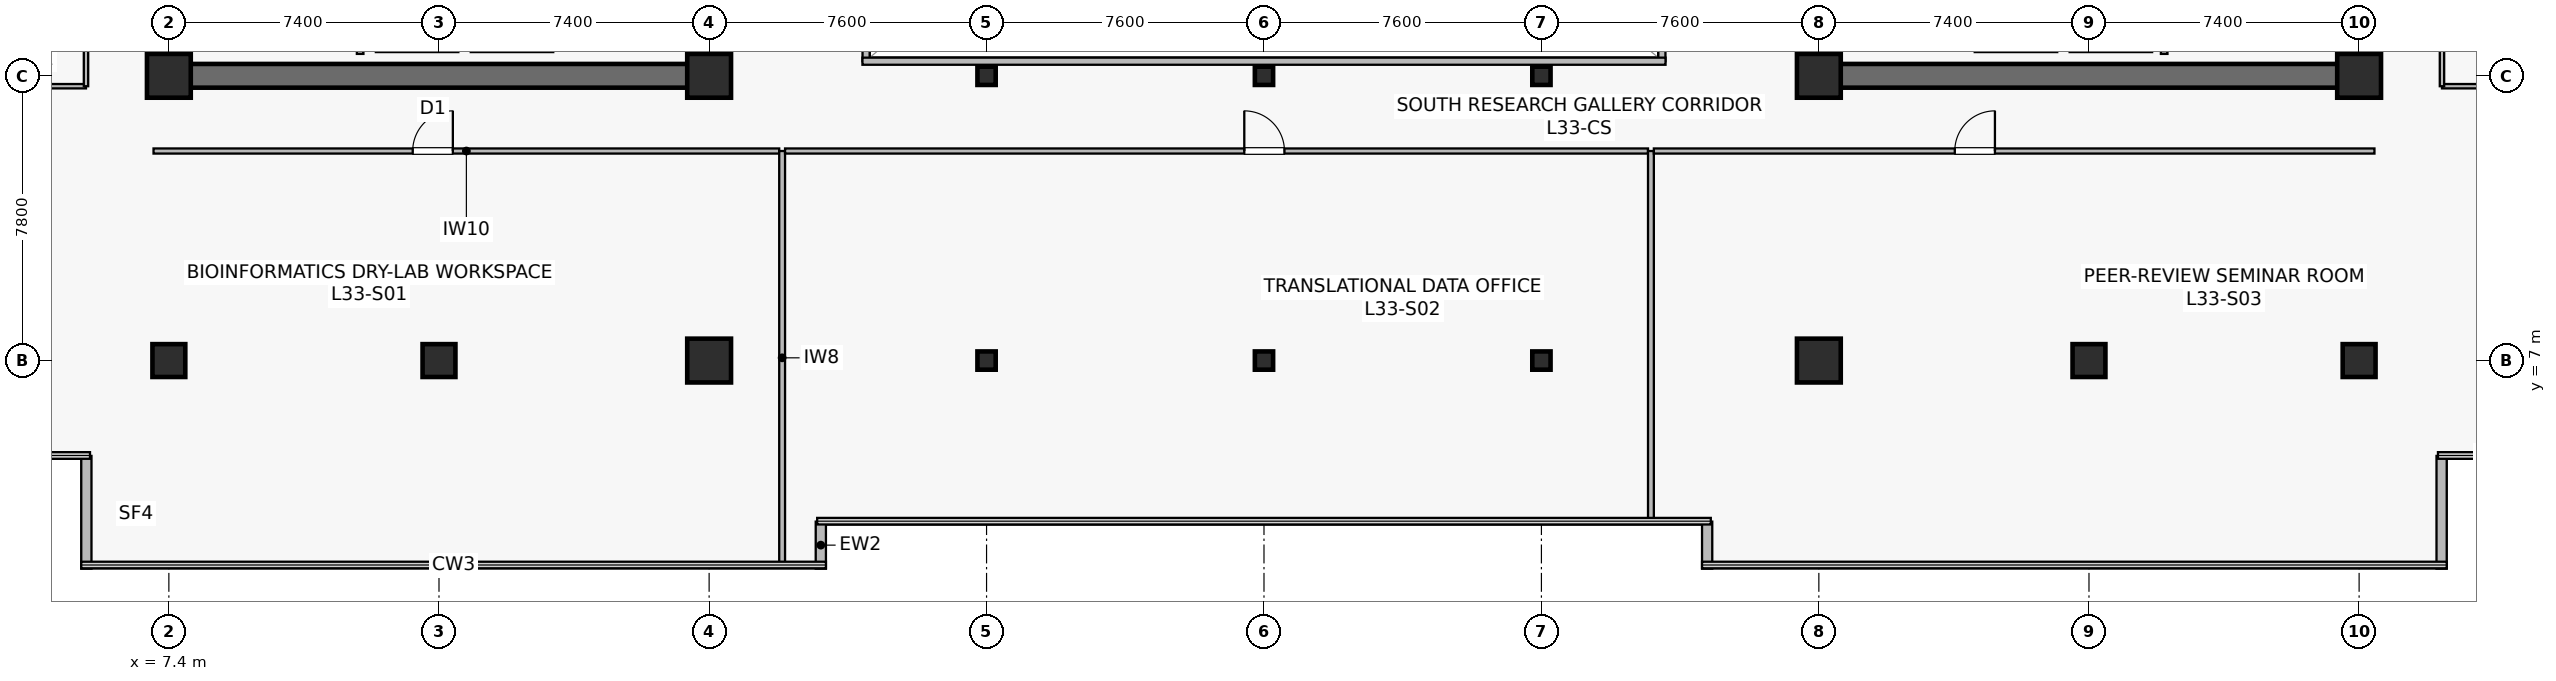
"""IFC4 building model, lengths in metres.
Left out: names, types, materials, properties, quantities, classifications, styles, units other than length and angle.
Written with IfcOpenShell. Run it as: python <this file> out.ifc"""

import sys

from ifc_helpers import new_model, si_unit, direction, frame, frame_2d, origin, origin_2d, place, context, subcontext, project, spatial, rectangle, hollow_rectangle, extrude, source, transform, mapped, element, fill, save


model = new_model("IFC4")
c1 = context("Model", 3, precision=1e-05, world=origin(), true_north=direction((0.0, 1.0)))
c2 = subcontext(c1, "Body", "Model", "MODEL_VIEW")
j1 = project(units=[si_unit("LENGTHUNIT", "METRE"), si_unit("PLANEANGLEUNIT", "RADIAN")], contexts=[c1])
p1 = place(None, origin())
s1 = spatial("IfcSite", under=j1, at=p1, CompositionType="ELEMENT")
p2 = place(p1, origin())
s2 = spatial("IfcBuilding", under=s1, at=p2, CompositionType="ELEMENT")
p3 = place(p2, frame((0.0, 0.0, 137.9)))
s3 = spatial("IfcBuildingStorey", under=s2, at=p3, CompositionType="ELEMENT", Elevation=137.9)
p4 = place(p3, frame((7.075, 14.8, 0.0), z_axis=(0.0, 0.0, 1.0), x_axis=(1.0, 0.0, 0.0)))
e1 = element("IfcWall", 1, at=p4, inside=s3, PredefinedType="SHEAR", context=c2, shape_type="SweptSolid", body=[
    extrude(rectangle(XDim=15.45, YDim=0.65, at=frame_2d((7.725, 0.0))), origin(), (0.0, 0.0, 1.0), 3.79),
])
p5 = place(p3, frame((7.4, 15.125, 0.0), z_axis=(0.0, 0.0, 1.0), x_axis=(0.0, 1.0, 0.0)))
e2 = element("IfcWall", 2, at=p5, inside=s3, PredefinedType="SHEAR", context=c2, shape_type="SweptSolid", body=[
    extrude(rectangle(XDim=18.35, YDim=0.65, at=frame_2d((9.175, 0.0))), origin(), (0.0, 0.0, 1.0), 3.79),
])
p6 = place(p3, frame((22.2, 15.125, 0.0), z_axis=(0.0, 0.0, 1.0), x_axis=(0.0, 1.0, 0.0)))
e3 = element("IfcWall", 3, at=p6, inside=s3, PredefinedType="SHEAR", context=c2, shape_type="SweptSolid", body=[
    extrude(rectangle(XDim=18.35, YDim=0.65, at=frame_2d((9.175, 0.0))), origin(), (0.0, 0.0, 1.0), 3.79),
])
p7 = place(p6, frame((3.425, 0.0, 0.0)))
e4 = element("IfcOpeningElement", 4, at=p7, cuts=e3, PredefinedType="OPENING", context=c2, shape_type="SweptSolid", body=[
    extrude(rectangle(XDim=1.42, YDim=2.2, at=frame_2d((0.71, 1.1))), frame((0.0, 0.335, 0.0), z_axis=(0.0, -1.0, 0.0), x_axis=(1.0, 0.0, 0.0)), (0.0, 0.0, 1.0), 0.67),
])
p8 = place(p3, frame((52.275, 14.8, 0.0), z_axis=(0.0, 0.0, 1.0), x_axis=(1.0, 0.0, 0.0)))
e5 = element("IfcWall", 5, at=p8, inside=s3, PredefinedType="SHEAR", context=c2, shape_type="SweptSolid", body=[
    extrude(rectangle(XDim=15.45, YDim=0.65, at=frame_2d((7.725, 0.0))), origin(), (0.0, 0.0, 1.0), 3.79),
])
p9 = place(p3, frame((52.6, 15.125, 0.0), z_axis=(0.0, 0.0, 1.0), x_axis=(0.0, 1.0, 0.0)))
e6 = element("IfcWall", 6, at=p9, inside=s3, PredefinedType="SHEAR", context=c2, shape_type="SweptSolid", body=[
    extrude(rectangle(XDim=18.35, YDim=0.65, at=frame_2d((9.175, 0.0))), origin(), (0.0, 0.0, 1.0), 3.79),
])
p10 = place(p9, frame((3.425, 0.0, 0.0)))
e7 = element("IfcOpeningElement", 7, at=p10, cuts=e6, PredefinedType="OPENING", context=c2, shape_type="SweptSolid", body=[
    extrude(rectangle(XDim=1.42, YDim=2.2, at=frame_2d((0.71, 1.1))), frame((0.0, 0.335, 0.0), z_axis=(0.0, -1.0, 0.0), x_axis=(1.0, 0.0, 0.0)), (0.0, 0.0, 1.0), 0.67),
])
p11 = place(p3, frame((67.4, 15.125, 0.0), z_axis=(0.0, 0.0, 1.0), x_axis=(0.0, 1.0, 0.0)))
e8 = element("IfcWall", 8, at=p11, inside=s3, PredefinedType="SHEAR", context=c2, shape_type="SweptSolid", body=[
    extrude(rectangle(XDim=18.35, YDim=0.65, at=frame_2d((9.175, 0.0))), origin(), (0.0, 0.0, 1.0), 3.79),
])
m1 = source(origin(), c2, "Body", "SweptSolid", [
    extrude(rectangle(XDim=0.9, YDim=0.9, at=origin_2d()), origin(), (0.0, 0.0, 1.0), 4.1),
])
p12 = place(p3, frame((14.8, 7.0, 0.0), z_axis=(0.0, 0.0, 1.0), x_axis=(1.0, 0.0, 0.0)))
e9 = element("IfcColumn", 9, at=p12, inside=s3, PredefinedType="COLUMN", context=c2, shape_type="MappedRepresentation", body=[
    mapped(m1, transform((0.0, 0.0, 0.0), scale=1.0)),
])
m2 = source(origin(), c2, "Body", "SweptSolid", [
    extrude(rectangle(XDim=1.2, YDim=1.2, at=origin_2d()), origin(), (0.0, 0.0, 1.0), 4.1),
])
for number, where, z_axis, x_axis in (
    (10, (22.2, 7.0, 0.0), (0.0, 0.0, 1.0), (1.0, 0.0, 0.0)),
    (11, (7.4, 14.8, 0.0), (0.0, 0.0, 1.0), (1.0, 0.0, 0.0)),
    (12, (22.2, 14.8, 0.0), (0.0, 0.0, 1.0), (1.0, 0.0, 0.0)),
    (13, (52.6, 7.0, 0.0), (0.0, 0.0, 1.0), (1.0, 0.0, 0.0)),
):
    element("IfcColumn", number, at=place(p3, frame(where, z_axis=z_axis, x_axis=x_axis)), inside=s3, PredefinedType="COLUMN", context=c2, shape_type="MappedRepresentation", body=[
        mapped(m2, transform((0.0, 0.0, 0.0), scale=1.0)),
    ])
p13 = place(p3, frame((60.0, 7.0, 0.0), z_axis=(0.0, 0.0, 1.0), x_axis=(1.0, 0.0, 0.0)))
e14 = element("IfcColumn", 14, at=p13, inside=s3, PredefinedType="COLUMN", context=c2, shape_type="MappedRepresentation", body=[
    mapped(m1, transform((0.0, 0.0, 0.0), scale=1.0)),
])
for number, where, z_axis, x_axis in (
    (15, (52.6, 14.8, 0.0), (0.0, 0.0, 1.0), (1.0, 0.0, 0.0)),
    (16, (67.4, 14.8, 0.0), (0.0, 0.0, 1.0), (1.0, 0.0, 0.0)),
):
    element("IfcColumn", number, at=place(p3, frame(where, z_axis=z_axis, x_axis=x_axis)), inside=s3, PredefinedType="COLUMN", context=c2, shape_type="MappedRepresentation", body=[
        mapped(m2, transform((0.0, 0.0, 0.0), scale=1.0)),
    ])
for number, where, z_axis, x_axis in (
    (17, (7.4, 7.0, 0.0), (0.0, 0.0, 1.0), (1.0, 0.0, 0.0)),
    (18, (67.4, 7.0, 0.0), (0.0, 0.0, 1.0), (1.0, 0.0, 0.0)),
):
    element("IfcColumn", number, at=place(p3, frame(where, z_axis=z_axis, x_axis=x_axis)), inside=s3, PredefinedType="COLUMN", context=c2, shape_type="MappedRepresentation", body=[
        mapped(m1, transform((0.0, 0.0, 0.0), scale=1.0)),
    ])
m3 = source(origin(), c2, "Body", "SweptSolid", [
    extrude(hollow_rectangle(XDim=0.5, YDim=0.5, WallThickness=0.022, at=origin_2d()), origin(), (0.0, 0.0, 1.0), 4.1),
])
for number, where, z_axis, x_axis in (
    (19, (29.8, 7.0, 0.0), (0.0, 0.0, 1.0), (1.0, 0.0, 0.0)),
    (20, (29.8, 14.8, 0.0), (0.0, 0.0, 1.0), (1.0, 0.0, 0.0)),
    (21, (37.4, 7.0, 0.0), (0.0, 0.0, 1.0), (1.0, 0.0, 0.0)),
    (22, (37.4, 14.8, 0.0), (0.0, 0.0, 1.0), (1.0, 0.0, 0.0)),
    (23, (45.0, 7.0, 0.0), (0.0, 0.0, 1.0), (1.0, 0.0, 0.0)),
    (24, (45.0, 14.8, 0.0), (0.0, 0.0, 1.0), (1.0, 0.0, 0.0)),
):
    element("IfcColumn", number, at=place(p3, frame(where, z_axis=z_axis, x_axis=x_axis)), inside=s3, PredefinedType="COLUMN", context=c2, shape_type="MappedRepresentation", body=[
        mapped(m3, transform((0.0, 0.0, 0.0), scale=1.0)),
    ])
for number, where, z_axis, x_axis in (
    (25, (25.26, 1.3, 0.0), (0.0, 0.0, 1.0), (0.0, 1.0, 0.0)),
    (26, (49.54, 2.588, 0.0), (0.0, 0.0, 1.0), (0.0, -1.0, 0.0)),
):
    element("IfcWall", number, at=place(p3, frame(where, z_axis=z_axis, x_axis=x_axis)), inside=s3, PredefinedType="STANDARD", context=c2, shape_type="SweptSolid", body=[
        extrude(rectangle(XDim=1.288, YDim=0.28, at=frame_2d((0.644, 0.0))), origin(), (0.0, 0.0, 1.0), 3.79),
    ])
for number, where, z_axis, x_axis in (
    (27, (69.66, 1.3, 0.0), (0.0, 0.0, 1.0), (0.0, 1.0, 0.0)),
    (28, (5.14, 4.388, 0.0), (0.0, 0.0, 1.0), (0.0, -1.0, 0.0)),
):
    element("IfcWall", number, at=place(p3, frame(where, z_axis=z_axis, x_axis=x_axis)), inside=s3, PredefinedType="STANDARD", context=c2, shape_type="SweptSolid", body=[
        extrude(rectangle(XDim=3.088, YDim=0.28, at=frame_2d((1.544, 0.0))), origin(), (0.0, 0.0, 1.0), 3.79),
    ])
p14 = place(p3, frame((13.07, 15.55, 0.0), z_axis=(0.0, 0.0, 1.0), x_axis=(1.0, 0.0, 0.0)))
e29 = element("IfcWall", 29, at=p14, inside=s3, PredefinedType="SOLIDWALL", context=c2, shape_type="SweptSolid", body=[
    extrude(rectangle(XDim=2.26, YDim=0.2, at=frame_2d((1.13, 0.0))), origin(), (0.0, 0.0, 1.0), 3.125),
])
p15 = place(p3, frame((15.67, 15.55, 0.0), z_axis=(0.0, 0.0, 1.0), x_axis=(1.0, 0.0, 0.0)))
e30 = element("IfcWall", 30, at=p15, inside=s3, PredefinedType="SOLIDWALL", context=c2, shape_type="SweptSolid", body=[
    extrude(rectangle(XDim=2.26, YDim=0.2, at=frame_2d((1.13, 0.0))), origin(), (0.0, 0.0, 1.0), 3.79),
])
p16 = place(p3, frame((12.64, 15.4, 0.0), z_axis=(0.0, 0.0, 1.0), x_axis=(0.0, 1.0, 0.0)))
e31 = element("IfcWall", 31, at=p16, inside=s3, PredefinedType="SOLIDWALL", context=c2, shape_type="SweptSolid", body=[
    extrude(rectangle(XDim=2.4, YDim=0.18, at=frame_2d((1.2, 0.0))), origin(), (0.0, 0.0, 1.0), 3.79),
])
p17 = place(p3, frame((59.47, 15.55, 0.0), z_axis=(0.0, 0.0, 1.0), x_axis=(1.0, 0.0, 0.0)))
e32 = element("IfcWall", 32, at=p17, inside=s3, PredefinedType="SOLIDWALL", context=c2, shape_type="SweptSolid", body=[
    extrude(rectangle(XDim=2.26, YDim=0.2, at=frame_2d((1.13, 0.0))), origin(), (0.0, 0.0, 1.0), 3.125),
])
p18 = place(p3, frame((56.87, 15.55, 0.0), z_axis=(0.0, 0.0, 1.0), x_axis=(1.0, 0.0, 0.0)))
e33 = element("IfcWall", 33, at=p18, inside=s3, PredefinedType="SOLIDWALL", context=c2, shape_type="SweptSolid", body=[
    extrude(rectangle(XDim=2.26, YDim=0.2, at=frame_2d((1.13, 0.0))), origin(), (0.0, 0.0, 1.0), 3.79),
])
p19 = place(p3, frame((62.06, 15.4, 0.0), z_axis=(0.0, 0.0, 1.0), x_axis=(0.0, 1.0, 0.0)))
e34 = element("IfcWall", 34, at=p19, inside=s3, PredefinedType="SOLIDWALL", context=c2, shape_type="SweptSolid", body=[
    extrude(rectangle(XDim=2.4, YDim=0.18, at=frame_2d((1.2, 0.0))), origin(), (0.0, 0.0, 1.0), 3.79),
])
p20 = place(p3, frame((26.5, 15.2, 0.0), z_axis=(0.0, 0.0, 1.0), x_axis=(0.0, 1.0, 0.0)))
e35 = element("IfcWall", 35, at=p20, inside=s3, PredefinedType="SOLIDWALL", context=c2, shape_type="SweptSolid", body=[
    extrude(rectangle(XDim=18.2, YDim=0.195, at=frame_2d((9.1, 0.0))), origin(), (0.0, 0.0, 1.0), 3.79),
])
p21 = place(p20, frame((1.8, 0.0, 0.9)))
e36 = element("IfcOpeningElement", 36, at=p21, cuts=e35, PredefinedType="OPENING", context=c2, shape_type="SweptSolid", body=[
    extrude(rectangle(XDim=1.2, YDim=1.35, at=frame_2d((0.6, 0.675))), frame((0.0, 0.107, 0.0), z_axis=(0.0, -1.0, 0.0), x_axis=(1.0, 0.0, 0.0)), (0.0, 0.0, 1.0), 0.215),
])
p22 = place(p20, frame((13.2, 0.0, 0.9)))
e37 = element("IfcOpeningElement", 37, at=p22, cuts=e35, PredefinedType="OPENING", context=c2, shape_type="SweptSolid", body=[
    extrude(rectangle(XDim=1.2, YDim=1.35, at=frame_2d((0.6, 0.675))), frame((0.0, 0.107, 0.0), z_axis=(0.0, -1.0, 0.0), x_axis=(1.0, 0.0, 0.0)), (0.0, 0.0, 1.0), 0.215),
])
p23 = place(p3, frame((48.3, 15.2, 0.0), z_axis=(0.0, 0.0, 1.0), x_axis=(0.0, 1.0, 0.0)))
e38 = element("IfcWall", 38, at=p23, inside=s3, PredefinedType="SOLIDWALL", context=c2, shape_type="SweptSolid", body=[
    extrude(rectangle(XDim=18.2, YDim=0.195, at=frame_2d((9.1, 0.0))), origin(), (0.0, 0.0, 1.0), 3.79),
])
p24 = place(p23, frame((1.8, 0.0, 0.9)))
e39 = element("IfcOpeningElement", 39, at=p24, cuts=e38, PredefinedType="OPENING", context=c2, shape_type="SweptSolid", body=[
    extrude(rectangle(XDim=1.2, YDim=1.35, at=frame_2d((0.6, 0.675))), frame((0.0, 0.107, 0.0), z_axis=(0.0, -1.0, 0.0), x_axis=(1.0, 0.0, 0.0)), (0.0, 0.0, 1.0), 0.215),
])
p25 = place(p23, frame((13.2, 0.0, 0.9)))
e40 = element("IfcOpeningElement", 40, at=p25, cuts=e38, PredefinedType="OPENING", context=c2, shape_type="SweptSolid", body=[
    extrude(rectangle(XDim=1.2, YDim=1.35, at=frame_2d((0.6, 0.675))), frame((0.0, 0.107, 0.0), z_axis=(0.0, -1.0, 0.0), x_axis=(1.0, 0.0, 0.0)), (0.0, 0.0, 1.0), 0.215),
])
p26 = place(p3, frame((26.4, 15.2, 0.0), z_axis=(0.0, 0.0, 1.0), x_axis=(1.0, 0.0, 0.0)))
e41 = element("IfcWall", 41, at=p26, inside=s3, PredefinedType="SOLIDWALL", context=c2, shape_type="SweptSolid", body=[
    extrude(rectangle(XDim=22.0, YDim=0.195, at=frame_2d((11.0, 0.0))), origin(), (0.0, 0.0, 1.0), 3.79),
])
p27 = place(p3, frame((6.98, 12.74, 0.0), z_axis=(0.0, 0.0, 1.0), x_axis=(1.0, 0.0, 0.0)))
e42 = element("IfcWall", 42, at=p27, inside=s3, PredefinedType="PARTITIONING", context=c2, shape_type="SweptSolid", body=[
    extrude(rectangle(XDim=17.14, YDim=0.14, at=frame_2d((8.57, 0.0))), origin(), (0.0, 0.0, 1.0), 3.125),
])
p28 = place(p27, frame((7.1, 0.0, 0.0)))
e43 = element("IfcOpeningElement", 43, at=p28, cuts=e42, PredefinedType="OPENING", context=c2, shape_type="SweptSolid", body=[
    extrude(rectangle(XDim=1.1, YDim=2.18, at=frame_2d((0.55, 1.09))), frame((0.0, 0.08, 0.0), z_axis=(0.0, -1.0, 0.0), x_axis=(1.0, 0.0, 0.0)), (0.0, 0.0, 1.0), 0.16),
])
p29 = place(p3, frame((24.2, 1.41, 0.0), z_axis=(0.0, 0.0, 1.0), x_axis=(0.0, 1.0, 0.0)))
e44 = element("IfcWall", 44, at=p29, inside=s3, PredefinedType="PARTITIONING", context=c2, shape_type="SweptSolid", body=[
    extrude(rectangle(XDim=11.33, YDim=0.16, at=frame_2d((5.665, 0.0))), origin(), (0.0, 0.0, 1.0), 3.075),
])
p30 = place(p3, frame((24.28, 12.74, 0.0), z_axis=(0.0, 0.0, 1.0), x_axis=(1.0, 0.0, 0.0)))
e45 = element("IfcWall", 45, at=p30, inside=s3, PredefinedType="PARTITIONING", context=c2, shape_type="SweptSolid", body=[
    extrude(rectangle(XDim=23.64, YDim=0.14, at=frame_2d((11.82, 0.0))), origin(), (0.0, 0.0, 1.0), 3.125),
])
p31 = place(p30, frame((12.58, 0.0, 0.0)))
e46 = element("IfcOpeningElement", 46, at=p31, cuts=e45, PredefinedType="OPENING", context=c2, shape_type="SweptSolid", body=[
    extrude(rectangle(XDim=1.1, YDim=2.18, at=frame_2d((0.55, 1.09))), frame((0.0, 0.08, 0.0), z_axis=(0.0, -1.0, 0.0), x_axis=(1.0, 0.0, 0.0)), (0.0, 0.0, 1.0), 0.16),
])
p32 = place(p3, frame((48.0, 2.61, 0.0), z_axis=(0.0, 0.0, 1.0), x_axis=(0.0, 1.0, 0.0)))
e47 = element("IfcWall", 47, at=p32, inside=s3, PredefinedType="PARTITIONING", context=c2, shape_type="SweptSolid", body=[
    extrude(rectangle(XDim=10.13, YDim=0.16, at=frame_2d((5.065, 0.0))), origin(), (0.0, 0.0, 1.0), 3.075),
])
p33 = place(p3, frame((48.08, 12.74, 0.0), z_axis=(0.0, 0.0, 1.0), x_axis=(1.0, 0.0, 0.0)))
e48 = element("IfcWall", 48, at=p33, inside=s3, PredefinedType="PARTITIONING", context=c2, shape_type="SweptSolid", body=[
    extrude(rectangle(XDim=19.74, YDim=0.14, at=frame_2d((9.87, 0.0))), origin(), (0.0, 0.0, 1.0), 3.125),
])
p34 = place(p33, frame((8.244, 0.0, 0.0)))
e49 = element("IfcOpeningElement", 49, at=p34, cuts=e48, PredefinedType="OPENING", context=c2, shape_type="SweptSolid", body=[
    extrude(rectangle(XDim=1.1, YDim=2.18, at=frame_2d((0.55, 1.09))), frame((0.0, 0.08, 0.0), z_axis=(0.0, -1.0, 0.0), x_axis=(1.0, 0.0, 0.0)), (0.0, 0.0, 1.0), 0.16),
])
p35 = place(p3, frame((2.11, 14.515, 0.0), z_axis=(0.0, 0.0, 1.0), x_axis=(1.0, 0.0, 0.0)))
e50 = element("IfcWall", 50, at=p35, inside=s3, PredefinedType="PARTITIONING", context=c2, shape_type="SweptSolid", body=[
    extrude(rectangle(XDim=3.02, YDim=0.12, at=frame_2d((1.51, 0.0))), origin(), (0.0, 0.0, 1.0), 3.79),
])
p36 = place(p3, frame((5.13, 14.515, 0.0), z_axis=(0.0, 0.0, 1.0), x_axis=(0.0, 1.0, 0.0)))
e51 = element("IfcWall", 51, at=p36, inside=s3, PredefinedType="PARTITIONING", context=c2, shape_type="SweptSolid", body=[
    extrude(rectangle(XDim=5.025, YDim=0.12, at=frame_2d((2.513, 0.0))), origin(), (0.0, 0.0, 1.0), 3.79),
])
p37 = place(p36, frame((2.062, 0.0, 0.0)))
e52 = element("IfcOpeningElement", 52, at=p37, cuts=e51, PredefinedType="OPENING", context=c2, shape_type="SweptSolid", body=[
    extrude(rectangle(XDim=0.9, YDim=2.1, at=frame_2d((0.45, 1.05))), frame((0.0, 0.07, 0.0), z_axis=(0.0, -1.0, 0.0), x_axis=(1.0, 0.0, 0.0)), (0.0, 0.0, 1.0), 0.14),
])
p38 = place(p3, frame((69.67, 14.515, 0.0), z_axis=(0.0, 0.0, 1.0), x_axis=(1.0, 0.0, 0.0)))
e53 = element("IfcWall", 53, at=p38, inside=s3, PredefinedType="PARTITIONING", context=c2, shape_type="SweptSolid", body=[
    extrude(rectangle(XDim=3.02, YDim=0.12, at=frame_2d((1.51, 0.0))), origin(), (0.0, 0.0, 1.0), 3.79),
])
p39 = place(p3, frame((69.67, 14.515, 0.0), z_axis=(0.0, 0.0, 1.0), x_axis=(0.0, 1.0, 0.0)))
e54 = element("IfcWall", 54, at=p39, inside=s3, PredefinedType="PARTITIONING", context=c2, shape_type="SweptSolid", body=[
    extrude(rectangle(XDim=9.225, YDim=0.12, at=frame_2d((4.613, 0.0))), origin(), (0.0, 0.0, 1.0), 3.79),
])
p40 = place(p39, frame((4.163, 0.0, 0.0)))
e55 = element("IfcOpeningElement", 55, at=p40, cuts=e54, PredefinedType="OPENING", context=c2, shape_type="SweptSolid", body=[
    extrude(rectangle(XDim=0.9, YDim=2.1, at=frame_2d((0.45, 1.05))), frame((0.0, 0.07, 0.0), z_axis=(0.0, -1.0, 0.0), x_axis=(1.0, 0.0, 0.0)), (0.0, 0.0, 1.0), 0.14),
])
m4 = source(origin(), c2, "Body", "SweptSolid", [
    extrude(rectangle(XDim=1.1, YDim=2.18, at=frame_2d((0.55, 1.09))), frame((0.0, 0.025, 0.0), z_axis=(0.0, -1.0, 0.0), x_axis=(1.0, 0.0, 0.0)), (0.0, 0.0, 1.0), 0.05),
])
p41 = place(p28, origin())
e56 = element("IfcDoor", 56, at=p41, inside=s3, OperationType="SINGLE_SWING_RIGHT", PredefinedType="DOOR", context=c2, shape_type="MappedRepresentation", body=[
    mapped(m4, transform((0.0, 0.0, 0.0), scale=1.0)),
])
fill(e43, e56)
p42 = place(p31, origin())
e57 = element("IfcDoor", 57, at=p42, inside=s3, OperationType="SINGLE_SWING_LEFT", PredefinedType="DOOR", context=c2, shape_type="MappedRepresentation", body=[
    mapped(m4, transform((0.0, 0.0, 0.0), scale=1.0)),
])
fill(e46, e57)
p43 = place(p34, origin())
e58 = element("IfcDoor", 58, at=p43, inside=s3, OperationType="SINGLE_SWING_RIGHT", PredefinedType="DOOR", context=c2, shape_type="MappedRepresentation", body=[
    mapped(m4, transform((0.0, 0.0, 0.0), scale=1.0)),
])
fill(e49, e58)
save(model, sys.argv[1])
